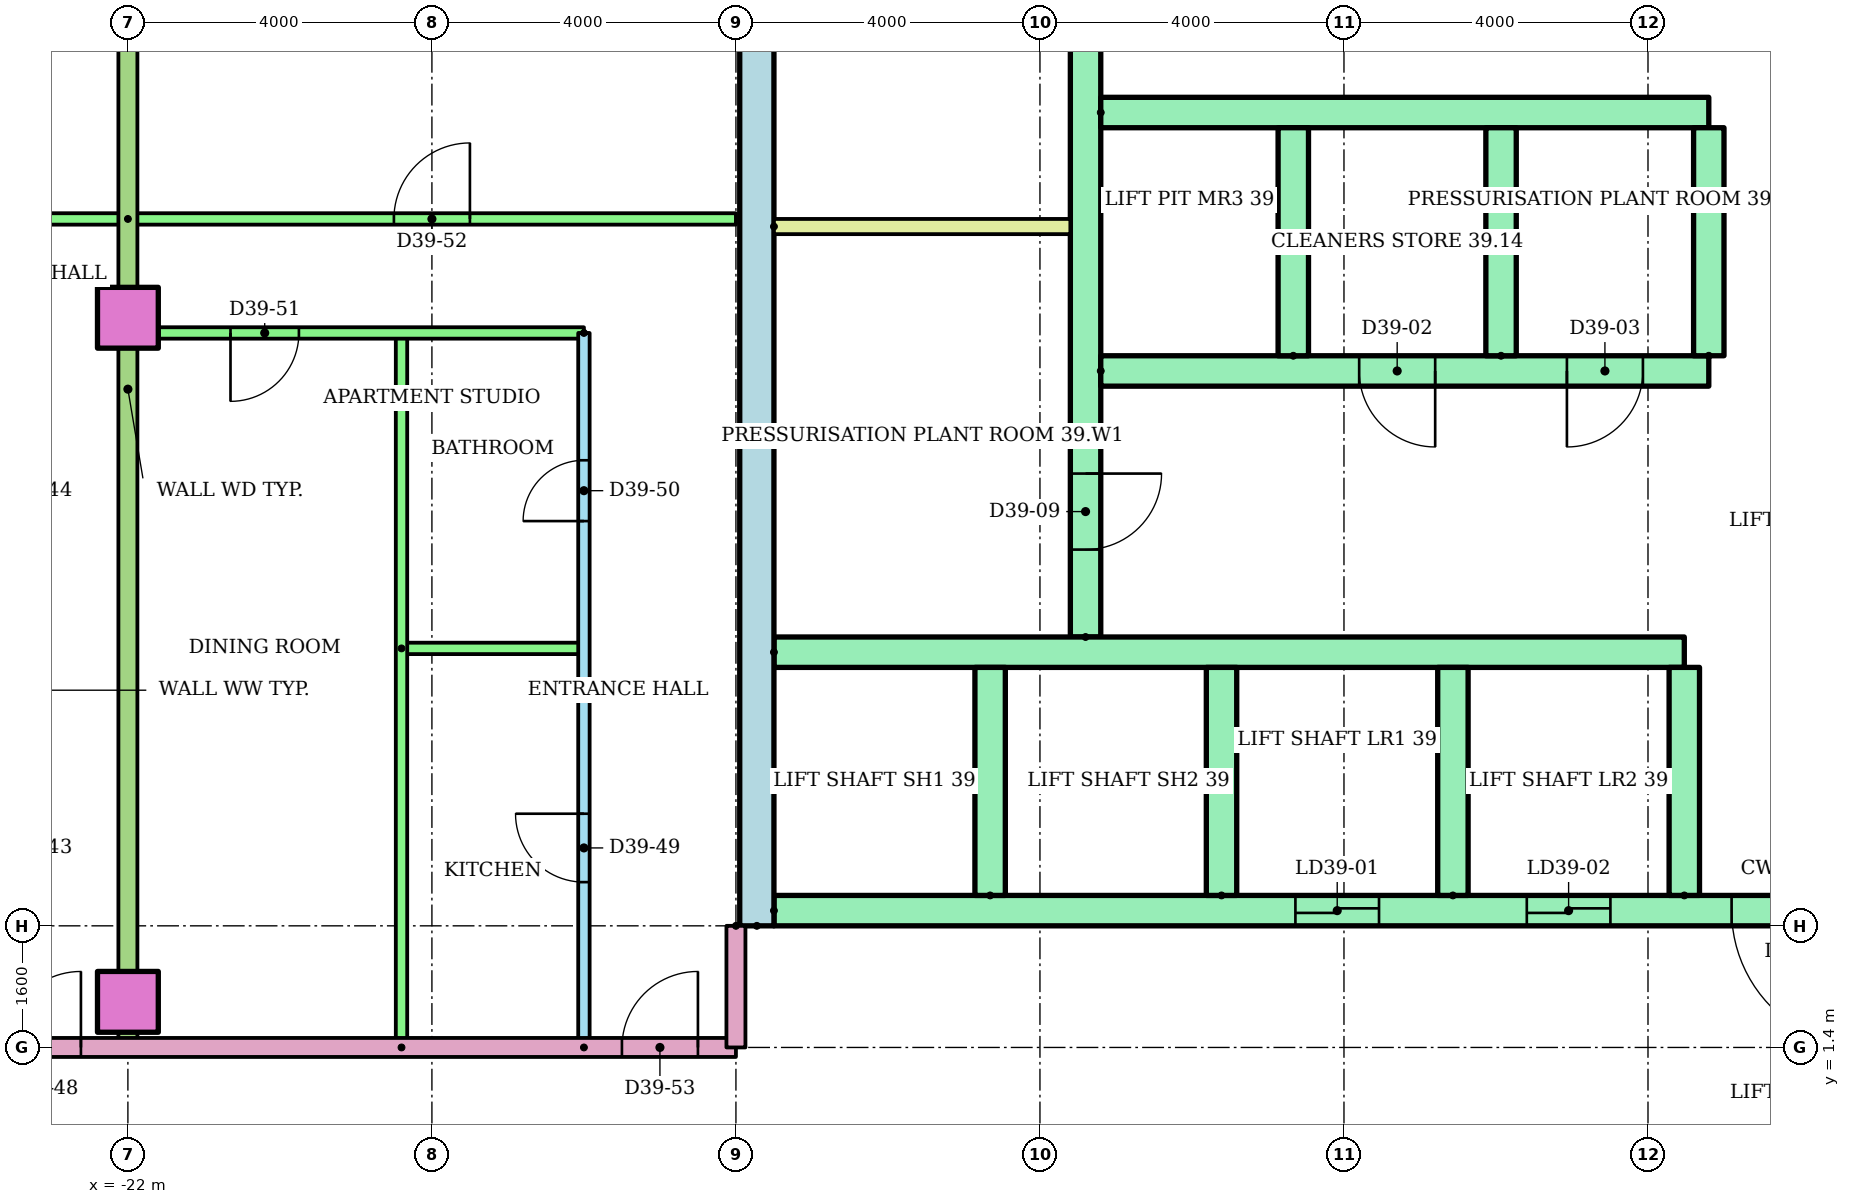
"""IFC4 building model, lengths in metres.
Left out: names, types, materials, properties, quantities, classifications, styles, units other than length and angle.
Written with IfcOpenShell. Run it as: python <this file> out.ifc"""

import sys

from ifc_helpers import new_model, si_unit, direction, frame, frame_2d, origin, origin_2d, place, context, subcontext, project, spatial, rectangle, extrude, element, fill, save


model = new_model("IFC4")
c1 = context("Model", 3, precision=1e-05, world=origin(), true_north=direction((0.0, 1.0)))
c2 = subcontext(c1, "Body", "Model", "MODEL_VIEW")
j1 = project(units=[si_unit("LENGTHUNIT", "METRE"), si_unit("PLANEANGLEUNIT", "RADIAN")], contexts=[c1])
p1 = place(None, origin())
s1 = spatial("IfcSite", under=j1, at=p1, CompositionType="ELEMENT")
p2 = place(p1, origin())
s2 = spatial("IfcBuilding", under=s1, at=p2, CompositionType="ELEMENT")
p3 = place(p2, frame((0.0, 0.0, 148.6)))
s3 = spatial("IfcBuildingStorey", under=s2, at=p3, CompositionType="ELEMENT", Elevation=148.6)
for number, where in (
    (1, (-22.0, 2.0, 0.0)),
    (2, (-22.0, 11.0, 0.0)),
):
    element("IfcColumn", number, at=place(p3, frame(where)), inside=s3, PredefinedType="COLUMN", context=c2, shape_type="SweptSolid", body=[
        extrude(rectangle(XDim=0.8, YDim=0.8, at=origin_2d()), origin(), (0.0, 0.0, 1.0), 3.2),
    ])
p4 = place(p3, frame((-13.725, 3.0, 0.0), z_axis=(0.0, 0.0, 1.0), x_axis=(0.0, 1.0, 0.0)))
e3 = element("IfcWall", 3, at=p4, inside=s3, PredefinedType="SHEAR", context=c2, shape_type="SweptSolid", body=[
    extrude(rectangle(XDim=17.0, YDim=0.45, at=frame_2d((8.5, 0.0))), origin(), (0.0, 0.0, 1.0), 2.8),
])
p5 = place(p3, frame((-9.4, 6.8, 0.0), z_axis=(0.0, 0.0, 1.0), x_axis=(0.0, 1.0, 0.0)))
e4 = element("IfcWall", 4, at=p5, inside=s3, PredefinedType="SHEAR", context=c2, shape_type="SweptSolid", body=[
    extrude(rectangle(XDim=12.7, YDim=0.4, at=frame_2d((6.35, 0.0))), origin(), (0.0, 0.0, 1.0), 2.8),
])
p6 = place(p5, frame((1.15, 0.0, 0.0)))
e5 = element("IfcOpeningElement", 5, at=p6, cuts=e4, PredefinedType="OPENING", context=c2, shape_type="SweptSolid", body=[
    extrude(rectangle(XDim=1.0, YDim=2.1, at=frame_2d((0.5, 1.05))), frame((0.0, 0.21, 0.0), z_axis=(0.0, -1.0, 0.0), x_axis=(1.0, 0.0, 0.0)), (0.0, 0.0, 1.0), 0.42),
])
p7 = place(p5, frame((7.925, 0.0, 0.0)))
e6 = element("IfcOpeningElement", 6, at=p7, cuts=e4, PredefinedType="OPENING", context=c2, shape_type="SweptSolid", body=[
    extrude(rectangle(XDim=1.0, YDim=2.1, at=frame_2d((0.5, 1.05))), frame((0.0, 0.21, 0.0), z_axis=(0.0, -1.0, 0.0), x_axis=(1.0, 0.0, 0.0)), (0.0, 0.0, 1.0), 0.42),
])
p8 = place(p3, frame((-13.5, 3.2, 0.0)))
e7 = element("IfcWall", 7, at=p8, inside=s3, PredefinedType="SHEAR", context=c2, shape_type="SweptSolid", body=[
    extrude(rectangle(XDim=27.0, YDim=0.4, at=frame_2d((13.5, 0.0))), origin(), (0.0, 0.0, 1.0), 2.8),
])
p9 = place(p8, frame((6.861, 0.0, 0.0)))
e8 = element("IfcOpeningElement", 8, at=p9, cuts=e7, PredefinedType="OPENING", context=c2, shape_type="SweptSolid", body=[
    extrude(rectangle(XDim=1.1, YDim=2.1, at=frame_2d((0.55, 1.05))), frame((0.0, 0.21, 0.0), z_axis=(0.0, -1.0, 0.0), x_axis=(1.0, 0.0, 0.0)), (0.0, 0.0, 1.0), 0.42),
])
p10 = place(p8, frame((9.906, 0.0, 0.0)))
e9 = element("IfcOpeningElement", 9, at=p10, cuts=e7, PredefinedType="OPENING", context=c2, shape_type="SweptSolid", body=[
    extrude(rectangle(XDim=1.1, YDim=2.1, at=frame_2d((0.55, 1.05))), frame((0.0, 0.21, 0.0), z_axis=(0.0, -1.0, 0.0), x_axis=(1.0, 0.0, 0.0)), (0.0, 0.0, 1.0), 0.42),
])
p11 = place(p8, frame((15.994, 0.0, 0.0)))
e10 = element("IfcOpeningElement", 10, at=p11, cuts=e7, PredefinedType="OPENING", context=c2, shape_type="SweptSolid", body=[
    extrude(rectangle(XDim=1.1, YDim=2.1, at=frame_2d((0.55, 1.05))), frame((0.0, 0.21, 0.0), z_axis=(0.0, -1.0, 0.0), x_axis=(1.0, 0.0, 0.0)), (0.0, 0.0, 1.0), 0.42),
])
p12 = place(p8, frame((19.039, 0.0, 0.0)))
e11 = element("IfcOpeningElement", 11, at=p12, cuts=e7, PredefinedType="OPENING", context=c2, shape_type="SweptSolid", body=[
    extrude(rectangle(XDim=1.1, YDim=2.1, at=frame_2d((0.55, 1.05))), frame((0.0, 0.21, 0.0), z_axis=(0.0, -1.0, 0.0), x_axis=(1.0, 0.0, 0.0)), (0.0, 0.0, 1.0), 0.42),
])
p13 = place(p8, frame((12.6, 0.0, 0.0)))
e12 = element("IfcOpeningElement", 12, at=p13, cuts=e7, PredefinedType="OPENING", context=c2, shape_type="SweptSolid", body=[
    extrude(rectangle(XDim=1.8, YDim=2.1, at=frame_2d((0.9, 1.05))), frame((0.0, 0.21, 0.0), z_axis=(0.0, -1.0, 0.0), x_axis=(1.0, 0.0, 0.0)), (0.0, 0.0, 1.0), 0.42),
])
p14 = place(p3, frame((-13.5, 6.6, 0.0)))
e13 = element("IfcWall", 13, at=p14, inside=s3, PredefinedType="SHEAR", context=c2, shape_type="SweptSolid", body=[
    extrude(rectangle(XDim=11.978, YDim=0.4, at=frame_2d((5.989, 0.0))), origin(), (0.0, 0.0, 1.0), 2.8),
])
for number, where, z_axis, x_axis in (
    (14, (-10.656, 3.4, 0.0), (0.0, 0.0, 1.0), (0.0, 1.0, 0.0)),
    (15, (-7.611, 3.4, 0.0), (0.0, 0.0, 1.0), (0.0, 1.0, 0.0)),
    (16, (-4.567, 3.4, 0.0), (0.0, 0.0, 1.0), (0.0, 1.0, 0.0)),
    (17, (-1.522, 3.4, 0.0), (0.0, 0.0, 1.0), (0.0, 1.0, 0.0)),
):
    element("IfcWall", number, at=place(p3, frame(where, z_axis=z_axis, x_axis=x_axis)), inside=s3, PredefinedType="SHEAR", context=c2, shape_type="SweptSolid", body=[
        extrude(rectangle(XDim=3.0, YDim=0.4, at=frame_2d((1.5, 0.0))), origin(), (0.0, 0.0, 1.0), 2.8),
    ])
p15 = place(p3, frame((-9.2, 10.3, 0.0)))
e18 = element("IfcWall", 18, at=p15, inside=s3, PredefinedType="SHEAR", context=c2, shape_type="SweptSolid", body=[
    extrude(rectangle(XDim=8.0, YDim=0.4, at=frame_2d((4.0, 0.0))), origin(), (0.0, 0.0, 1.0), 2.8),
])
p16 = place(p15, frame((3.4, 0.0, 0.0)))
e19 = element("IfcOpeningElement", 19, at=p16, cuts=e18, PredefinedType="OPENING", context=c2, shape_type="SweptSolid", body=[
    extrude(rectangle(XDim=1.0, YDim=2.1, at=frame_2d((0.5, 1.05))), frame((0.0, 0.21, 0.0), z_axis=(0.0, -1.0, 0.0), x_axis=(1.0, 0.0, 0.0)), (0.0, 0.0, 1.0), 0.42),
])
p17 = place(p15, frame((6.133, 0.0, 0.0)))
e20 = element("IfcOpeningElement", 20, at=p17, cuts=e18, PredefinedType="OPENING", context=c2, shape_type="SweptSolid", body=[
    extrude(rectangle(XDim=1.0, YDim=2.1, at=frame_2d((0.5, 1.05))), frame((0.0, 0.21, 0.0), z_axis=(0.0, -1.0, 0.0), x_axis=(1.0, 0.0, 0.0)), (0.0, 0.0, 1.0), 0.42),
])
p18 = place(p3, frame((-9.2, 13.7, 0.0)))
e21 = element("IfcWall", 21, at=p18, inside=s3, PredefinedType="SHEAR", context=c2, shape_type="SweptSolid", body=[
    extrude(rectangle(XDim=8.0, YDim=0.4, at=frame_2d((4.0, 0.0))), origin(), (0.0, 0.0, 1.0), 2.8),
])
for number, where, z_axis, x_axis in (
    (22, (-6.667, 10.5, 0.0), (0.0, 0.0, 1.0), (0.0, 1.0, 0.0)),
    (23, (-3.933, 10.5, 0.0), (0.0, 0.0, 1.0), (0.0, 1.0, 0.0)),
    (24, (-1.2, 10.5, 0.0), (0.0, 0.0, 1.0), (0.0, 1.0, 0.0)),
):
    element("IfcWall", number, at=place(p3, frame(where, z_axis=z_axis, x_axis=x_axis)), inside=s3, PredefinedType="SHEAR", context=c2, shape_type="SweptSolid", body=[
        extrude(rectangle(XDim=3.0, YDim=0.4, at=frame_2d((1.5, 0.0))), origin(), (0.0, 0.0, 1.0), 2.8),
    ])
p19 = place(p3, frame((-13.5, 12.2, 0.0)))
e25 = element("IfcWall", 25, at=p19, inside=s3, PredefinedType="PARTITIONING", context=c2, shape_type="SweptSolid", body=[
    extrude(rectangle(XDim=3.9, YDim=0.2, at=frame_2d((1.95, 0.0))), origin(), (0.0, 0.0, 1.0), 2.8),
])
p20 = place(p3, frame((-32.72, 12.3, 0.0)))
e26 = element("IfcWall", 26, at=p20, inside=s3, PredefinedType="PARTITIONING", context=c2, shape_type="SweptSolid", body=[
    extrude(rectangle(XDim=10.72, YDim=0.15, at=frame_2d((5.36, 0.0))), origin(), (0.0, 0.0, 1.0), 2.4),
])
p21 = place(p20, frame((1.102, 0.0, 0.0)))
e27 = element("IfcOpeningElement", 27, at=p21, cuts=e26, PredefinedType="OPENING", context=c2, shape_type="SweptSolid", body=[
    extrude(rectangle(XDim=1.0, YDim=2.1, at=frame_2d((0.5, 1.05))), frame((0.0, 0.085, 0.0), z_axis=(0.0, -1.0, 0.0), x_axis=(1.0, 0.0, 0.0)), (0.0, 0.0, 1.0), 0.17),
])
p22 = place(p20, frame((7.22, 0.0, 0.0)))
e28 = element("IfcOpeningElement", 28, at=p22, cuts=e26, PredefinedType="OPENING", context=c2, shape_type="SweptSolid", body=[
    extrude(rectangle(XDim=1.0, YDim=2.1, at=frame_2d((0.5, 1.05))), frame((0.0, 0.085, 0.0), z_axis=(0.0, -1.0, 0.0), x_axis=(1.0, 0.0, 0.0)), (0.0, 0.0, 1.0), 0.17),
])
p23 = place(p3, frame((-16.0, 1.4, 0.0), z_axis=(0.0, 0.0, 1.0), x_axis=(0.0, 1.0, 0.0)))
e29 = element("IfcWall", 29, at=p23, inside=s3, PredefinedType="PARTITIONING", context=c2, shape_type="SweptSolid", body=[
    extrude(rectangle(XDim=9.4, YDim=0.15, at=frame_2d((4.7, 0.0))), origin(), (0.0, 0.0, 1.0), 2.4),
])
p24 = place(p23, frame((2.175, 0.0, 0.0)))
e30 = element("IfcOpeningElement", 30, at=p24, cuts=e29, PredefinedType="OPENING", context=c2, shape_type="SweptSolid", body=[
    extrude(rectangle(XDim=0.9, YDim=2.1, at=frame_2d((0.45, 1.05))), frame((0.0, 0.085, 0.0), z_axis=(0.0, -1.0, 0.0), x_axis=(1.0, 0.0, 0.0)), (0.0, 0.0, 1.0), 0.17),
])
p25 = place(p23, frame((6.925, 0.0, 0.0)))
e31 = element("IfcOpeningElement", 31, at=p25, cuts=e29, PredefinedType="OPENING", context=c2, shape_type="SweptSolid", body=[
    extrude(rectangle(XDim=0.8, YDim=2.1, at=frame_2d((0.4, 1.05))), frame((0.0, 0.085, 0.0), z_axis=(0.0, -1.0, 0.0), x_axis=(1.0, 0.0, 0.0)), (0.0, 0.0, 1.0), 0.17),
])
p26 = place(p3, frame((-18.4, 6.65, 0.0)))
e32 = element("IfcWall", 32, at=p26, inside=s3, PredefinedType="PARTITIONING", context=c2, shape_type="SweptSolid", body=[
    extrude(rectangle(XDim=2.4, YDim=0.15, at=frame_2d((1.2, 0.0))), origin(), (0.0, 0.0, 1.0), 2.4),
])
p27 = place(p3, frame((-18.4, 1.4, 0.0), z_axis=(0.0, 0.0, 1.0), x_axis=(0.0, 1.0, 0.0)))
e33 = element("IfcWall", 33, at=p27, inside=s3, PredefinedType="PARTITIONING", context=c2, shape_type="SweptSolid", body=[
    extrude(rectangle(XDim=9.4, YDim=0.15, at=frame_2d((4.7, 0.0))), origin(), (0.0, 0.0, 1.0), 2.4),
])
p28 = place(p3, frame((-16.0, 10.8, 0.0), z_axis=(0.0, 0.0, 1.0), x_axis=(-1.0, 0.0, 0.0)))
e34 = element("IfcWall", 34, at=p28, inside=s3, PredefinedType="PARTITIONING", context=c2, shape_type="SweptSolid", body=[
    extrude(rectangle(XDim=6.0, YDim=0.15, at=frame_2d((3.0, 0.0))), origin(), (0.0, 0.0, 1.0), 2.4),
])
p29 = place(p28, frame((3.75, 0.0, 0.0)))
e35 = element("IfcOpeningElement", 35, at=p29, cuts=e34, PredefinedType="OPENING", context=c2, shape_type="SweptSolid", body=[
    extrude(rectangle(XDim=0.9, YDim=2.1, at=frame_2d((0.45, 1.05))), frame((0.0, 0.085, 0.0), z_axis=(0.0, -1.0, 0.0), x_axis=(1.0, 0.0, 0.0)), (0.0, 0.0, 1.0), 0.17),
])
p30 = place(p3, frame((-22.0, 12.3, 0.0)))
e36 = element("IfcWall", 36, at=p30, inside=s3, PredefinedType="PARTITIONING", context=c2, shape_type="SweptSolid", body=[
    extrude(rectangle(XDim=8.0, YDim=0.15, at=frame_2d((4.0, 0.0))), origin(), (0.0, 0.0, 1.0), 2.4),
])
p31 = place(p30, frame((3.5, 0.0, 0.0)))
e37 = element("IfcOpeningElement", 37, at=p31, cuts=e36, PredefinedType="OPENING", context=c2, shape_type="SweptSolid", body=[
    extrude(rectangle(XDim=1.0, YDim=2.1, at=frame_2d((0.5, 1.05))), frame((0.0, 0.085, 0.0), z_axis=(0.0, -1.0, 0.0), x_axis=(1.0, 0.0, 0.0)), (0.0, 0.0, 1.0), 0.17),
])
p32 = place(p3, frame((-22.0, 18.721, 0.0), z_axis=(0.0, 0.0, 1.0), x_axis=(0.0, -1.0, 0.0)))
e38 = element("IfcWall", 38, at=p32, inside=s3, PredefinedType="PARTITIONING", context=c2, shape_type="SweptSolid", body=[
    extrude(rectangle(XDim=17.321, YDim=0.25, at=frame_2d((8.661, 0.0))), origin(), (0.0, 0.0, 1.0), 2.4),
])
p33 = place(p3, frame((-29.0, 1.4, 0.0)))
e39 = element("IfcWall", 39, at=p33, inside=s3, PredefinedType="PARTITIONING", context=c2, shape_type="SweptSolid", body=[
    extrude(rectangle(XDim=15.0, YDim=0.25, at=frame_2d((7.5, 0.0))), origin(), (0.0, 0.0, 1.0), 2.4),
])
p34 = place(p33, frame((5.382, 0.0, 0.0)))
e40 = element("IfcOpeningElement", 40, at=p34, cuts=e39, PredefinedType="OPENING", context=c2, shape_type="SweptSolid", body=[
    extrude(rectangle(XDim=1.0, YDim=2.1, at=frame_2d((0.5, 1.05))), frame((0.0, 0.135, 0.0), z_axis=(0.0, -1.0, 0.0), x_axis=(1.0, 0.0, 0.0)), (0.0, 0.0, 1.0), 0.27),
])
p35 = place(p33, frame((13.5, 0.0, 0.0)))
e41 = element("IfcOpeningElement", 41, at=p35, cuts=e39, PredefinedType="OPENING", context=c2, shape_type="SweptSolid", body=[
    extrude(rectangle(XDim=1.0, YDim=2.1, at=frame_2d((0.5, 1.05))), frame((0.0, 0.135, 0.0), z_axis=(0.0, -1.0, 0.0), x_axis=(1.0, 0.0, 0.0)), (0.0, 0.0, 1.0), 0.27),
])
p36 = place(p3, frame((-14.0, 3.0, 0.0), z_axis=(0.0, 0.0, 1.0), x_axis=(0.0, -1.0, 0.0)))
e42 = element("IfcWall", 42, at=p36, inside=s3, PredefinedType="PARTITIONING", context=c2, shape_type="SweptSolid", body=[
    extrude(rectangle(XDim=1.6, YDim=0.25, at=frame_2d((0.8, 0.0))), origin(), (0.0, 0.0, 1.0), 2.4),
])
p37 = place(p9, origin())
e43 = element("IfcDoor", 43, at=p37, inside=s3, OperationType="SLIDING_TO_LEFT", PredefinedType="DOOR", context=c2, shape_type="SweptSolid", body=[
    extrude(rectangle(XDim=1.1, YDim=2.1, at=frame_2d((0.55, 1.05))), frame((0.0, 0.025, 0.0), z_axis=(0.0, -1.0, 0.0), x_axis=(1.0, 0.0, 0.0)), (0.0, 0.0, 1.0), 0.05),
])
fill(e8, e43)
p38 = place(p10, origin())
e44 = element("IfcDoor", 44, at=p38, inside=s3, OperationType="SLIDING_TO_LEFT", PredefinedType="DOOR", context=c2, shape_type="SweptSolid", body=[
    extrude(rectangle(XDim=1.1, YDim=2.1, at=frame_2d((0.55, 1.05))), frame((0.0, 0.025, 0.0), z_axis=(0.0, -1.0, 0.0), x_axis=(1.0, 0.0, 0.0)), (0.0, 0.0, 1.0), 0.05),
])
fill(e9, e44)
p39 = place(p13, frame((1.8, 0.0, 0.0), z_axis=(0.0, 0.0, 1.0), x_axis=(-1.0, 0.0, 0.0)))
e45 = element("IfcDoor", 45, at=p39, inside=s3, OperationType="DOUBLE_DOOR_SINGLE_SWING", PredefinedType="DOOR", context=c2, shape_type="SweptSolid", body=[
    extrude(rectangle(XDim=1.8, YDim=2.1, at=frame_2d((0.9, 1.05))), frame((0.0, 0.025, 0.0), z_axis=(0.0, -1.0, 0.0), x_axis=(1.0, 0.0, 0.0)), (0.0, 0.0, 1.0), 0.05),
])
fill(e12, e45)
p40 = place(p16, frame((1.0, 0.0, 0.0), z_axis=(0.0, 0.0, 1.0), x_axis=(-1.0, 0.0, 0.0)))
e46 = element("IfcDoor", 46, at=p40, inside=s3, OperationType="SINGLE_SWING_RIGHT", PredefinedType="DOOR", context=c2, shape_type="SweptSolid", body=[
    extrude(rectangle(XDim=1.0, YDim=2.1, at=frame_2d((0.5, 1.05))), frame((0.0, 0.025, 0.0), z_axis=(0.0, -1.0, 0.0), x_axis=(1.0, 0.0, 0.0)), (0.0, 0.0, 1.0), 0.05),
])
fill(e19, e46)
p41 = place(p17, frame((1.0, 0.0, 0.0), z_axis=(0.0, 0.0, 1.0), x_axis=(-1.0, 0.0, 0.0)))
e47 = element("IfcDoor", 47, at=p41, inside=s3, OperationType="SINGLE_SWING_LEFT", PredefinedType="DOOR", context=c2, shape_type="SweptSolid", body=[
    extrude(rectangle(XDim=1.0, YDim=2.1, at=frame_2d((0.5, 1.05))), frame((0.0, 0.025, 0.0), z_axis=(0.0, -1.0, 0.0), x_axis=(1.0, 0.0, 0.0)), (0.0, 0.0, 1.0), 0.05),
])
fill(e20, e47)
p42 = place(p6, frame((1.0, 0.0, 0.0), z_axis=(0.0, 0.0, 1.0), x_axis=(-1.0, 0.0, 0.0)))
e48 = element("IfcDoor", 48, at=p42, inside=s3, OperationType="SINGLE_SWING_RIGHT", PredefinedType="DOOR", context=c2, shape_type="SweptSolid", body=[
    extrude(rectangle(XDim=1.0, YDim=2.1, at=frame_2d((0.5, 1.05))), frame((0.0, 0.025, 0.0), z_axis=(0.0, -1.0, 0.0), x_axis=(1.0, 0.0, 0.0)), (0.0, 0.0, 1.0), 0.05),
])
fill(e5, e48)
p43 = place(p34, origin())
e49 = element("IfcDoor", 49, at=p43, inside=s3, OperationType="SINGLE_SWING_RIGHT", PredefinedType="DOOR", context=c2, shape_type="SweptSolid", body=[
    extrude(rectangle(XDim=1.0, YDim=2.1, at=frame_2d((0.5, 1.05))), frame((0.0, 0.025, 0.0), z_axis=(0.0, -1.0, 0.0), x_axis=(1.0, 0.0, 0.0)), (0.0, 0.0, 1.0), 0.05),
])
fill(e40, e49)
p44 = place(p24, origin())
e50 = element("IfcDoor", 50, at=p44, inside=s3, OperationType="SINGLE_SWING_RIGHT", PredefinedType="DOOR", context=c2, shape_type="SweptSolid", body=[
    extrude(rectangle(XDim=0.9, YDim=2.1, at=frame_2d((0.45, 1.05))), frame((0.0, 0.025, 0.0), z_axis=(0.0, -1.0, 0.0), x_axis=(1.0, 0.0, 0.0)), (0.0, 0.0, 1.0), 0.05),
])
fill(e30, e50)
p45 = place(p25, origin())
e51 = element("IfcDoor", 51, at=p45, inside=s3, OperationType="SINGLE_SWING_LEFT", PredefinedType="DOOR", context=c2, shape_type="SweptSolid", body=[
    extrude(rectangle(XDim=0.8, YDim=2.1, at=frame_2d((0.4, 1.05))), frame((0.0, 0.025, 0.0), z_axis=(0.0, -1.0, 0.0), x_axis=(1.0, 0.0, 0.0)), (0.0, 0.0, 1.0), 0.05),
])
fill(e31, e51)
p46 = place(p29, origin())
e52 = element("IfcDoor", 52, at=p46, inside=s3, OperationType="SINGLE_SWING_RIGHT", PredefinedType="DOOR", context=c2, shape_type="SweptSolid", body=[
    extrude(rectangle(XDim=0.9, YDim=2.1, at=frame_2d((0.45, 1.05))), frame((0.0, 0.025, 0.0), z_axis=(0.0, -1.0, 0.0), x_axis=(1.0, 0.0, 0.0)), (0.0, 0.0, 1.0), 0.05),
])
fill(e35, e52)
p47 = place(p31, origin())
e53 = element("IfcDoor", 53, at=p47, inside=s3, OperationType="SINGLE_SWING_RIGHT", PredefinedType="DOOR", context=c2, shape_type="SweptSolid", body=[
    extrude(rectangle(XDim=1.0, YDim=2.1, at=frame_2d((0.5, 1.05))), frame((0.0, 0.025, 0.0), z_axis=(0.0, -1.0, 0.0), x_axis=(1.0, 0.0, 0.0)), (0.0, 0.0, 1.0), 0.05),
])
fill(e37, e53)
p48 = place(p35, origin())
e54 = element("IfcDoor", 54, at=p48, inside=s3, OperationType="SINGLE_SWING_RIGHT", PredefinedType="DOOR", context=c2, shape_type="SweptSolid", body=[
    extrude(rectangle(XDim=1.0, YDim=2.1, at=frame_2d((0.5, 1.05))), frame((0.0, 0.025, 0.0), z_axis=(0.0, -1.0, 0.0), x_axis=(1.0, 0.0, 0.0)), (0.0, 0.0, 1.0), 0.05),
])
fill(e41, e54)
save(model, sys.argv[1])
